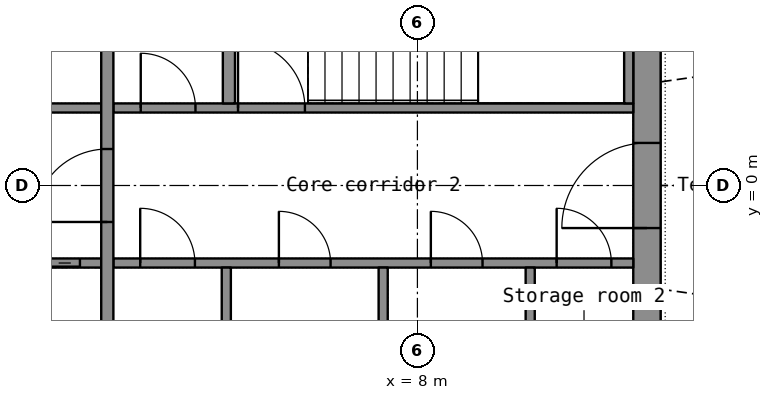
"""IFC4 building model, lengths in metres.
Left out: names, types, materials, properties, quantities, classifications, styles, units other than length and angle.
Written with IfcOpenShell. Run it as: python <this file> out.ifc"""

import sys

from ifc_helpers import new_model, si_unit, direction, frame, frame_2d, origin, place, context, subcontext, project, spatial, rectangle, extrude, element, fill, save


model = new_model("IFC4")
c1 = context("Model", 3, precision=1e-05, world=origin(), true_north=direction((0.0, 1.0)))
c2 = subcontext(c1, "Body", "Model", "MODEL_VIEW")
j1 = project(units=[si_unit("LENGTHUNIT", "METRE"), si_unit("PLANEANGLEUNIT", "RADIAN")], contexts=[c1])
p1 = place(None, origin())
s1 = spatial("IfcSite", under=j1, at=p1, CompositionType="ELEMENT")
p2 = place(p1, origin())
s2 = spatial("IfcBuilding", under=s1, at=p2, CompositionType="ELEMENT")
p3 = place(p2, frame((0.0, 0.0, 157.1)))
s3 = spatial("IfcBuildingStorey", under=s2, at=p3, CompositionType="ELEMENT", Elevation=157.1)
p4 = place(p3, frame((11.775, -7.2, 0.0), z_axis=(0.0, 0.0, 1.0), x_axis=(0.0, 1.0, 0.0)))
e1 = element("IfcWall", 1, at=p4, inside=s3, PredefinedType="SHEAR", context=c2, shape_type="SweptSolid", body=[
    extrude(rectangle(XDim=14.4, YDim=0.45, at=frame_2d((7.2, 0.0))), origin(), (0.0, 0.0, 1.0), 3.3),
])
p5 = place(p4, frame((6.5, 0.0, 0.0)))
e2 = element("IfcOpeningElement", 2, at=p5, cuts=e1, PredefinedType="OPENING", context=c2, shape_type="SweptSolid", body=[
    extrude(rectangle(XDim=1.4, YDim=2.2, at=frame_2d((0.7, 1.1))), frame((0.0, 0.235, 0.0), z_axis=(0.0, -1.0, 0.0), x_axis=(1.0, 0.0, 0.0)), (0.0, 0.0, 1.0), 0.47),
])
p6 = place(p3, frame((-2.8, -1.275, 0.0), z_axis=(0.0, 0.0, 1.0), x_axis=(1.0, 0.0, 0.0)))
e3 = element("IfcWall", 3, at=p6, inside=s3, PredefinedType="SHEAR", context=c2, shape_type="SweptSolid", body=[
    extrude(rectangle(XDim=5.6, YDim=0.15, at=frame_2d((2.8, 0.0))), origin(), (0.0, 0.0, 1.0), 3.3),
])
p7 = place(p6, frame((4.15, 0.0, 0.0)))
e4 = element("IfcOpeningElement", 4, at=p7, cuts=e3, PredefinedType="OPENING", context=c2, shape_type="SweptSolid", body=[
    extrude(rectangle(XDim=1.1, YDim=2.2, at=frame_2d((0.55, 1.1))), frame((0.0, 0.085, 0.0), z_axis=(0.0, -1.0, 0.0), x_axis=(1.0, 0.0, 0.0)), (0.0, 0.0, 1.0), 0.17),
])
p8 = place(p6, frame((1.35, 0.0, 0.0)))
e5 = element("IfcOpeningElement", 5, at=p8, cuts=e3, PredefinedType="OPENING", context=c2, shape_type="SweptSolid", body=[
    extrude(rectangle(XDim=0.9, YDim=2.1, at=frame_2d((0.45, 1.05))), frame((0.0, 0.085, 0.0), z_axis=(0.0, -1.0, 0.0), x_axis=(1.0, 0.0, 0.0)), (0.0, 0.0, 1.0), 0.17),
])
p9 = place(p3, frame((3.0, -1.275, 0.0), z_axis=(0.0, 0.0, 1.0), x_axis=(1.0, 0.0, 0.0)))
e6 = element("IfcWall", 6, at=p9, inside=s3, PredefinedType="PARTITIONING", context=c2, shape_type="SweptSolid", body=[
    extrude(rectangle(XDim=8.55, YDim=0.15, at=frame_2d((4.275, 0.0))), origin(), (0.0, 0.0, 1.0), 3.3),
])
p10 = place(p9, frame((0.441, 0.0, 0.0)))
e7 = element("IfcOpeningElement", 7, at=p10, cuts=e6, PredefinedType="OPENING", context=c2, shape_type="SweptSolid", body=[
    extrude(rectangle(XDim=0.9, YDim=2.1, at=frame_2d((0.45, 1.05))), frame((0.0, 0.085, 0.0), z_axis=(0.0, -1.0, 0.0), x_axis=(1.0, 0.0, 0.0)), (0.0, 0.0, 1.0), 0.17),
])
p11 = place(p9, frame((2.722, 0.0, 0.0)))
e8 = element("IfcOpeningElement", 8, at=p11, cuts=e6, PredefinedType="OPENING", context=c2, shape_type="SweptSolid", body=[
    extrude(rectangle(XDim=0.85, YDim=2.1, at=frame_2d((0.425, 1.05))), frame((0.0, 0.085, 0.0), z_axis=(0.0, -1.0, 0.0), x_axis=(1.0, 0.0, 0.0)), (0.0, 0.0, 1.0), 0.17),
])
p12 = place(p9, frame((5.221, 0.0, 0.0)))
e9 = element("IfcOpeningElement", 9, at=p12, cuts=e6, PredefinedType="OPENING", context=c2, shape_type="SweptSolid", body=[
    extrude(rectangle(XDim=0.85, YDim=2.1, at=frame_2d((0.425, 1.05))), frame((0.0, 0.085, 0.0), z_axis=(0.0, -1.0, 0.0), x_axis=(1.0, 0.0, 0.0)), (0.0, 0.0, 1.0), 0.17),
])
p13 = place(p9, frame((7.29, 0.0, 0.0)))
e10 = element("IfcOpeningElement", 10, at=p13, cuts=e6, PredefinedType="OPENING", context=c2, shape_type="SweptSolid", body=[
    extrude(rectangle(XDim=0.9, YDim=2.1, at=frame_2d((0.45, 1.05))), frame((0.0, 0.085, 0.0), z_axis=(0.0, -1.0, 0.0), x_axis=(1.0, 0.0, 0.0)), (0.0, 0.0, 1.0), 0.17),
])
p14 = place(p3, frame((-2.8, 1.275, 0.0), z_axis=(0.0, 0.0, 1.0), x_axis=(1.0, 0.0, 0.0)))
e11 = element("IfcWall", 11, at=p14, inside=s3, PredefinedType="SHEAR", context=c2, shape_type="SweptSolid", body=[
    extrude(rectangle(XDim=5.6, YDim=0.15, at=frame_2d((2.8, 0.0))), origin(), (0.0, 0.0, 1.0), 3.3),
])
p15 = place(p14, frame((0.35, 0.0, 0.0)))
e12 = element("IfcOpeningElement", 12, at=p15, cuts=e11, PredefinedType="OPENING", context=c2, shape_type="SweptSolid", body=[
    extrude(rectangle(XDim=1.1, YDim=2.2, at=frame_2d((0.55, 1.1))), frame((0.0, 0.085, 0.0), z_axis=(0.0, -1.0, 0.0), x_axis=(1.0, 0.0, 0.0)), (0.0, 0.0, 1.0), 0.17),
])
p16 = place(p14, frame((3.35, 0.0, 0.0)))
e13 = element("IfcOpeningElement", 13, at=p16, cuts=e11, PredefinedType="OPENING", context=c2, shape_type="SweptSolid", body=[
    extrude(rectangle(XDim=0.9, YDim=2.1, at=frame_2d((0.45, 1.05))), frame((0.0, 0.085, 0.0), z_axis=(0.0, -1.0, 0.0), x_axis=(1.0, 0.0, 0.0)), (0.0, 0.0, 1.0), 0.17),
])
p17 = place(p3, frame((3.0, 1.275, 0.0), z_axis=(0.0, 0.0, 1.0), x_axis=(1.0, 0.0, 0.0)))
e14 = element("IfcWall", 14, at=p17, inside=s3, PredefinedType="SHEAR", context=c2, shape_type="SweptSolid", body=[
    extrude(rectangle(XDim=8.55, YDim=0.15, at=frame_2d((4.275, 0.0))), origin(), (0.0, 0.0, 1.0), 3.3),
])
p18 = place(p17, frame((2.05, 0.0, 0.0)))
e15 = element("IfcOpeningElement", 15, at=p18, cuts=e14, PredefinedType="OPENING", context=c2, shape_type="SweptSolid", body=[
    extrude(rectangle(XDim=1.1, YDim=2.15, at=frame_2d((0.55, 1.075))), frame((0.0, 0.085, 0.0), z_axis=(0.0, -1.0, 0.0), x_axis=(1.0, 0.0, 0.0)), (0.0, 0.0, 1.0), 0.17),
])
p19 = place(p17, frame((0.45, 0.0, 0.0)))
e16 = element("IfcOpeningElement", 16, at=p19, cuts=e14, PredefinedType="OPENING", context=c2, shape_type="SweptSolid", body=[
    extrude(rectangle(XDim=0.9, YDim=2.1, at=frame_2d((0.45, 1.05))), frame((0.0, 0.085, 0.0), z_axis=(0.0, -1.0, 0.0), x_axis=(1.0, 0.0, 0.0)), (0.0, 0.0, 1.0), 0.17),
])
p20 = place(p3, frame((2.9, -3.7, 0.0), z_axis=(0.0, 0.0, 1.0), x_axis=(0.0, 1.0, 0.0)))
e17 = element("IfcWall", 17, at=p20, inside=s3, PredefinedType="SHEAR", context=c2, shape_type="SweptSolid", body=[
    extrude(rectangle(XDim=7.4, YDim=0.2, at=frame_2d((3.7, 0.0))), origin(), (0.0, 0.0, 1.0), 3.3),
])
p21 = place(p20, frame((3.1, 0.0, 0.0)))
e18 = element("IfcOpeningElement", 18, at=p21, cuts=e17, PredefinedType="OPENING", context=c2, shape_type="SweptSolid", body=[
    extrude(rectangle(XDim=1.2, YDim=2.2, at=frame_2d((0.6, 1.1))), frame((0.0, 0.11, 0.0), z_axis=(0.0, -1.0, 0.0), x_axis=(1.0, 0.0, 0.0)), (0.0, 0.0, 1.0), 0.22),
])
p22 = place(p3, frame((11.475, 1.35, 0.0), z_axis=(0.0, 0.0, 1.0), x_axis=(0.0, 1.0, 0.0)))
e19 = element("IfcWall", 19, at=p22, inside=s3, PredefinedType="SHEAR", context=c2, shape_type="SweptSolid", body=[
    extrude(rectangle(XDim=2.35, YDim=0.15, at=frame_2d((1.175, 0.0))), origin(), (0.0, 0.0, 1.0), 3.3),
])
p23 = place(p3, frame((4.9, 1.35, 0.0), z_axis=(0.0, 0.0, 1.0), x_axis=(0.0, 1.0, 0.0)))
e20 = element("IfcWall", 20, at=p23, inside=s3, PredefinedType="SHEAR", context=c2, shape_type="SweptSolid", body=[
    extrude(rectangle(XDim=2.35, YDim=0.2, at=frame_2d((1.175, 0.0))), origin(), (0.0, 0.0, 1.0), 3.3),
])
for number, where, z_axis, x_axis in (
    (21, (4.857, -3.7, 0.0), (0.0, 0.0, 1.0), (0.0, 1.0, 0.0)),
    (22, (7.437, -3.7, 0.0), (0.0, 0.0, 1.0), (0.0, 1.0, 0.0)),
    (23, (9.855, -3.7, 0.0), (0.0, 0.0, 1.0), (0.0, 1.0, 0.0)),
):
    element("IfcWall", number, at=place(p3, frame(where, z_axis=z_axis, x_axis=x_axis)), inside=s3, PredefinedType="PARTITIONING", context=c2, shape_type="SweptSolid", body=[
        extrude(rectangle(XDim=2.35, YDim=0.15, at=frame_2d((1.175, 0.0))), origin(), (0.0, 0.0, 1.0), 3.3),
    ])
p24 = place(p5, origin())
e24 = element("IfcDoor", 24, at=p24, inside=s3, OperationType="DOUBLE_DOOR_SINGLE_SWING", PredefinedType="DOOR", context=c2, shape_type="SweptSolid", body=[
    extrude(rectangle(XDim=1.4, YDim=2.2, at=frame_2d((0.7, 1.1))), frame((0.0, 0.025, 0.0), z_axis=(0.0, -1.0, 0.0), x_axis=(1.0, 0.0, 0.0)), (0.0, 0.0, 1.0), 0.05),
])
fill(e2, e24)
p25 = place(p21, origin())
e25 = element("IfcDoor", 25, at=p25, inside=s3, OperationType="SINGLE_SWING_LEFT", PredefinedType="DOOR", context=c2, shape_type="SweptSolid", body=[
    extrude(rectangle(XDim=1.2, YDim=2.2, at=frame_2d((0.6, 1.1))), frame((0.0, 0.025, 0.0), z_axis=(0.0, -1.0, 0.0), x_axis=(1.0, 0.0, 0.0)), (0.0, 0.0, 1.0), 0.05),
])
fill(e18, e25)
p26 = place(p7, origin())
e26 = element("IfcDoor", 26, at=p26, inside=s3, OperationType="DOUBLE_DOOR_SLIDING", PredefinedType="DOOR", context=c2, shape_type="SweptSolid", body=[
    extrude(rectangle(XDim=1.1, YDim=2.2, at=frame_2d((0.55, 1.1))), frame((0.0, 0.025, 0.0), z_axis=(0.0, -1.0, 0.0), x_axis=(1.0, 0.0, 0.0)), (0.0, 0.0, 1.0), 0.05),
])
fill(e4, e26)
p27 = place(p18, origin())
e27 = element("IfcDoor", 27, at=p27, inside=s3, OperationType="SINGLE_SWING_LEFT", PredefinedType="DOOR", context=c2, shape_type="SweptSolid", body=[
    extrude(rectangle(XDim=1.1, YDim=2.15, at=frame_2d((0.55, 1.075))), frame((0.0, 0.025, 0.0), z_axis=(0.0, -1.0, 0.0), x_axis=(1.0, 0.0, 0.0)), (0.0, 0.0, 1.0), 0.05),
])
fill(e15, e27)
p28 = place(p10, origin())
e28 = element("IfcDoor", 28, at=p28, inside=s3, OperationType="SINGLE_SWING_LEFT", PredefinedType="DOOR", context=c2, shape_type="SweptSolid", body=[
    extrude(rectangle(XDim=0.9, YDim=2.1, at=frame_2d((0.45, 1.05))), frame((0.0, 0.025, 0.0), z_axis=(0.0, -1.0, 0.0), x_axis=(1.0, 0.0, 0.0)), (0.0, 0.0, 1.0), 0.05),
])
fill(e7, e28)
p29 = place(p11, origin())
e29 = element("IfcDoor", 29, at=p29, inside=s3, OperationType="SINGLE_SWING_LEFT", PredefinedType="DOOR", context=c2, shape_type="SweptSolid", body=[
    extrude(rectangle(XDim=0.85, YDim=2.1, at=frame_2d((0.425, 1.05))), frame((0.0, 0.025, 0.0), z_axis=(0.0, -1.0, 0.0), x_axis=(1.0, 0.0, 0.0)), (0.0, 0.0, 1.0), 0.05),
])
fill(e8, e29)
p30 = place(p12, origin())
e30 = element("IfcDoor", 30, at=p30, inside=s3, OperationType="SINGLE_SWING_LEFT", PredefinedType="DOOR", context=c2, shape_type="SweptSolid", body=[
    extrude(rectangle(XDim=0.85, YDim=2.1, at=frame_2d((0.425, 1.05))), frame((0.0, 0.025, 0.0), z_axis=(0.0, -1.0, 0.0), x_axis=(1.0, 0.0, 0.0)), (0.0, 0.0, 1.0), 0.05),
])
fill(e9, e30)
p31 = place(p13, origin())
e31 = element("IfcDoor", 31, at=p31, inside=s3, OperationType="SINGLE_SWING_LEFT", PredefinedType="DOOR", context=c2, shape_type="SweptSolid", body=[
    extrude(rectangle(XDim=0.9, YDim=2.1, at=frame_2d((0.45, 1.05))), frame((0.0, 0.025, 0.0), z_axis=(0.0, -1.0, 0.0), x_axis=(1.0, 0.0, 0.0)), (0.0, 0.0, 1.0), 0.05),
])
fill(e10, e31)
p32 = place(p19, origin())
e32 = element("IfcDoor", 32, at=p32, inside=s3, OperationType="SINGLE_SWING_LEFT", PredefinedType="DOOR", context=c2, shape_type="SweptSolid", body=[
    extrude(rectangle(XDim=0.9, YDim=2.1, at=frame_2d((0.45, 1.05))), frame((0.0, 0.025, 0.0), z_axis=(0.0, -1.0, 0.0), x_axis=(1.0, 0.0, 0.0)), (0.0, 0.0, 1.0), 0.05),
])
fill(e16, e32)
save(model, sys.argv[1])
